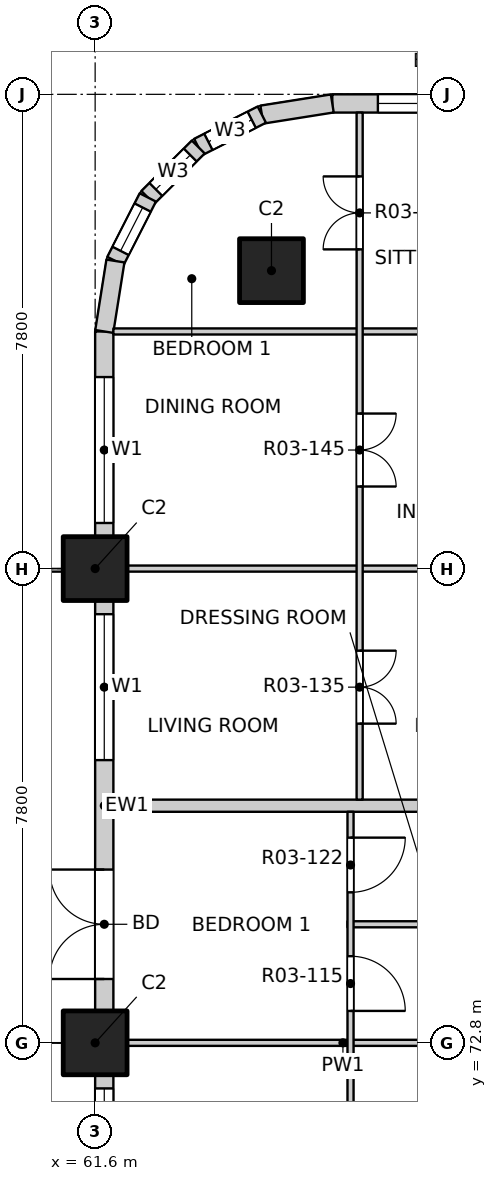
"""IFC4 building model, lengths in metres.
Left out: names, types, materials, properties, quantities, classifications, styles, units other than length and angle.
Written with IfcOpenShell. Run it as: python <this file> out.ifc"""

import sys

from ifc_helpers import new_model, si_unit, direction, frame, frame_2d, origin, origin_2d, place, context, subcontext, project, spatial, rectangle, extrude, element, fill, save


model = new_model("IFC4")
c1 = context("Model", 3, precision=1e-05, world=origin(), true_north=direction((0.0, 1.0)))
c2 = subcontext(c1, "Body", "Model", "MODEL_VIEW")
j1 = project(units=[si_unit("LENGTHUNIT", "METRE"), si_unit("PLANEANGLEUNIT", "RADIAN")], contexts=[c1])
p1 = place(None, origin())
s1 = spatial("IfcSite", under=j1, at=p1, CompositionType="ELEMENT")
p2 = place(p1, origin())
s2 = spatial("IfcBuilding", under=s1, at=p2, CompositionType="ELEMENT")
p3 = place(p2, frame((0.0, 0.0, 43.3)))
s3 = spatial("IfcBuildingStorey", under=s2, at=p3, CompositionType="ELEMENT", Elevation=43.3)
for number, where, z_axis, x_axis in (
    (1, (64.5, 85.5, -0.25), (0.0, 0.0, 1.0), (1.0, 0.0, 0.0)),
    (2, (61.6, 72.8, -0.25), (0.0, 0.0, 1.0), (1.0, 0.0, 0.0)),
    (3, (61.6, 80.6, -0.25), (0.0, 0.0, 1.0), (1.0, 0.0, 0.0)),
):
    element("IfcColumn", number, at=place(p3, frame(where, z_axis=z_axis, x_axis=x_axis)), inside=s3, PredefinedType="COLUMN", context=c2, shape_type="SweptSolid", body=[
        extrude(rectangle(XDim=1.05, YDim=1.05, at=origin_2d()), origin(), (0.0, 0.0, 1.0), 3.35),
    ])
p4 = place(p3, frame((65.5, 88.25, 0.0), z_axis=(0.0, 0.0, 1.0), x_axis=(1.0, 0.0, 0.0)))
e4 = element("IfcWall", 4, at=p4, inside=s3, PredefinedType="SOLIDWALL", context=c2, shape_type="SweptSolid", body=[
    extrude(rectangle(XDim=3.375, YDim=0.3, at=frame_2d((1.688, 0.0))), origin(), (0.0, 0.0, 1.0), 3.1),
])
p5 = place(p4, frame((0.75, 0.0, 0.9)))
e5 = element("IfcOpeningElement", 5, at=p5, cuts=e4, PredefinedType="OPENING", context=c2, shape_type="SweptSolid", body=[
    extrude(rectangle(XDim=2.4, YDim=1.8, at=frame_2d((1.2, 0.9))), frame((0.0, 0.16, 0.0), z_axis=(0.0, -1.0, 0.0), x_axis=(1.0, 0.0, 0.0)), (0.0, 0.0, 1.0), 0.32),
])
p6 = place(p3, frame((61.75, 65.525, 0.0), z_axis=(0.0, 0.0, 1.0), x_axis=(0.0, 1.0, 0.0)))
e6 = element("IfcWall", 6, at=p6, inside=s3, PredefinedType="SOLIDWALL", context=c2, shape_type="SweptSolid", body=[
    extrude(rectangle(XDim=6.75, YDim=0.3, at=frame_2d((3.375, 0.0))), origin(), (0.0, 0.0, 1.0), 3.1),
])
p7 = place(p6, frame((0.525, 0.0, 0.0)))
e7 = element("IfcOpeningElement", 7, at=p7, cuts=e6, PredefinedType="OPENING", context=c2, shape_type="SweptSolid", body=[
    extrude(rectangle(XDim=1.8, YDim=2.4, at=frame_2d((0.9, 1.2))), frame((0.0, 0.16, 0.0), z_axis=(0.0, -1.0, 0.0), x_axis=(1.0, 0.0, 0.0)), (0.0, 0.0, 1.0), 0.32),
])
p8 = place(p6, frame((4.125, 0.0, 0.9)))
e8 = element("IfcOpeningElement", 8, at=p8, cuts=e6, PredefinedType="OPENING", context=c2, shape_type="SweptSolid", body=[
    extrude(rectangle(XDim=2.4, YDim=1.8, at=frame_2d((1.2, 0.9))), frame((0.0, 0.16, 0.0), z_axis=(0.0, -1.0, 0.0), x_axis=(1.0, 0.0, 0.0)), (0.0, 0.0, 1.0), 0.32),
])
p9 = place(p3, frame((61.75, 73.325, 0.0), z_axis=(0.0, 0.0, 1.0), x_axis=(0.0, 1.0, 0.0)))
e9 = element("IfcWall", 9, at=p9, inside=s3, PredefinedType="SOLIDWALL", context=c2, shape_type="SweptSolid", body=[
    extrude(rectangle(XDim=6.75, YDim=0.3, at=frame_2d((3.375, 0.0))), origin(), (0.0, 0.0, 1.0), 3.1),
])
p10 = place(p9, frame((0.525, 0.0, 0.0)))
e10 = element("IfcOpeningElement", 10, at=p10, cuts=e9, PredefinedType="OPENING", context=c2, shape_type="SweptSolid", body=[
    extrude(rectangle(XDim=1.8, YDim=2.4, at=frame_2d((0.9, 1.2))), frame((0.0, 0.16, 0.0), z_axis=(0.0, -1.0, 0.0), x_axis=(1.0, 0.0, 0.0)), (0.0, 0.0, 1.0), 0.32),
])
p11 = place(p9, frame((4.125, 0.0, 0.9)))
e11 = element("IfcOpeningElement", 11, at=p11, cuts=e9, PredefinedType="OPENING", context=c2, shape_type="SweptSolid", body=[
    extrude(rectangle(XDim=2.4, YDim=1.8, at=frame_2d((1.2, 0.9))), frame((0.0, 0.16, 0.0), z_axis=(0.0, -1.0, 0.0), x_axis=(1.0, 0.0, 0.0)), (0.0, 0.0, 1.0), 0.32),
])
p12 = place(p3, frame((61.75, 81.125, 0.0), z_axis=(0.0, 0.0, 1.0), x_axis=(0.0, 1.0, 0.0)))
e12 = element("IfcWall", 12, at=p12, inside=s3, PredefinedType="SOLIDWALL", context=c2, shape_type="SweptSolid", body=[
    extrude(rectangle(XDim=3.375, YDim=0.3, at=frame_2d((1.688, 0.0))), origin(), (0.0, 0.0, 1.0), 3.1),
])
p13 = place(p12, frame((0.225, 0.0, 0.9)))
e13 = element("IfcOpeningElement", 13, at=p13, cuts=e12, PredefinedType="OPENING", context=c2, shape_type="SweptSolid", body=[
    extrude(rectangle(XDim=2.4, YDim=1.8, at=frame_2d((1.2, 0.9))), frame((0.0, 0.16, 0.0), z_axis=(0.0, -1.0, 0.0), x_axis=(1.0, 0.0, 0.0)), (0.0, 0.0, 1.0), 0.32),
])
p14 = place(p3, frame((65.5, 88.25, 0.0), z_axis=(0.0, 0.0, 1.0), x_axis=(-0.987678452879, -0.156496880861, 0.0)))
e14 = element("IfcWall", 14, at=p14, inside=s3, PredefinedType="SOLIDWALL", context=c2, shape_type="SweptSolid", body=[
    extrude(rectangle(XDim=1.173, YDim=0.3, at=frame_2d((0.586, 0.0))), origin(), (0.0, 0.0, 1.0), 3.1),
])
p15 = place(p3, frame((64.341, 88.066, 0.0), z_axis=(0.0, 0.0, 1.0), x_axis=(-0.890988677504, -0.454025524128, 0.0)))
e15 = element("IfcWall", 15, at=p15, inside=s3, PredefinedType="SOLIDWALL", context=c2, shape_type="SweptSolid", body=[
    extrude(rectangle(XDim=1.173, YDim=0.3, at=frame_2d((0.587, 0.0))), origin(), (0.0, 0.0, 1.0), 3.1),
])
p16 = place(p15, frame((0.187, 0.0, 0.9)))
e16 = element("IfcOpeningElement", 16, at=p16, cuts=e15, PredefinedType="OPENING", context=c2, shape_type="SweptSolid", body=[
    extrude(rectangle(XDim=0.8, YDim=1.2, at=frame_2d((0.4, 0.6))), frame((0.0, 0.16, 0.0), z_axis=(0.0, -1.0, 0.0), x_axis=(1.0, 0.0, 0.0)), (0.0, 0.0, 1.0), 0.32),
])
p17 = place(p3, frame((63.296, 87.534, 0.0), z_axis=(0.0, 0.0, 1.0), x_axis=(-0.707106781187, -0.707106781187, 0.0)))
e17 = element("IfcWall", 17, at=p17, inside=s3, PredefinedType="SOLIDWALL", context=c2, shape_type="SweptSolid", body=[
    extrude(rectangle(XDim=1.173, YDim=0.3, at=frame_2d((0.586, 0.0))), origin(), (0.0, 0.0, 1.0), 3.1),
])
p18 = place(p17, frame((0.187, 0.0, 0.9)))
e18 = element("IfcOpeningElement", 18, at=p18, cuts=e17, PredefinedType="OPENING", context=c2, shape_type="SweptSolid", body=[
    extrude(rectangle(XDim=0.8, YDim=1.2, at=frame_2d((0.4, 0.6))), frame((0.0, 0.16, 0.0), z_axis=(0.0, -1.0, 0.0), x_axis=(1.0, 0.0, 0.0)), (0.0, 0.0, 1.0), 0.32),
])
p19 = place(p3, frame((62.466, 86.704, 0.0), z_axis=(0.0, 0.0, 1.0), x_axis=(-0.454025524128, -0.890988677504, 0.0)))
e19 = element("IfcWall", 19, at=p19, inside=s3, PredefinedType="SOLIDWALL", context=c2, shape_type="SweptSolid", body=[
    extrude(rectangle(XDim=1.173, YDim=0.3, at=frame_2d((0.587, 0.0))), origin(), (0.0, 0.0, 1.0), 3.1),
])
p20 = place(p19, frame((0.187, 0.0, 0.9)))
e20 = element("IfcOpeningElement", 20, at=p20, cuts=e19, PredefinedType="OPENING", context=c2, shape_type="SweptSolid", body=[
    extrude(rectangle(XDim=0.8, YDim=1.2, at=frame_2d((0.4, 0.6))), frame((0.0, 0.16, 0.0), z_axis=(0.0, -1.0, 0.0), x_axis=(1.0, 0.0, 0.0)), (0.0, 0.0, 1.0), 0.32),
])
p21 = place(p3, frame((61.934, 85.659, 0.0), z_axis=(0.0, 0.0, 1.0), x_axis=(-0.156496880861, -0.987678452879, 0.0)))
e21 = element("IfcWall", 21, at=p21, inside=s3, PredefinedType="SOLIDWALL", context=c2, shape_type="SweptSolid", body=[
    extrude(rectangle(XDim=1.173, YDim=0.3, at=frame_2d((0.586, 0.0))), origin(), (0.0, 0.0, 1.0), 3.1),
])
p22 = place(p3, frame((61.9, 72.8, 0.0), z_axis=(0.0, 0.0, 1.0), x_axis=(1.0, 0.0, 0.0)))
e22 = element("IfcWall", 22, at=p22, inside=s3, PredefinedType="PARTITIONING", context=c2, shape_type="SweptSolid", body=[
    extrude(rectangle(XDim=7.55, YDim=0.1, at=frame_2d((3.775, 0.0))), origin(), (0.0, 0.0, 1.0), 3.1),
])
p23 = place(p3, frame((65.75, 74.75, 0.0), z_axis=(0.0, 0.0, 1.0), x_axis=(1.0, 0.0, 0.0)))
e23 = element("IfcWall", 23, at=p23, inside=s3, PredefinedType="PARTITIONING", context=c2, shape_type="SweptSolid", body=[
    extrude(rectangle(XDim=3.7, YDim=0.1, at=frame_2d((1.85, 0.0))), origin(), (0.0, 0.0, 1.0), 3.1),
])
p24 = place(p3, frame((61.9, 76.7, 0.0), z_axis=(0.0, 0.0, 1.0), x_axis=(1.0, 0.0, 0.0)))
e24 = element("IfcWall", 24, at=p24, inside=s3, PredefinedType="PARTITIONING", context=c2, shape_type="SweptSolid", body=[
    extrude(rectangle(XDim=11.5, YDim=0.2, at=frame_2d((5.75, 0.0))), origin(), (0.0, 0.0, 1.0), 3.1),
])
p25 = place(p3, frame((61.9, 80.6, 0.0), z_axis=(0.0, 0.0, 1.0), x_axis=(1.0, 0.0, 0.0)))
e25 = element("IfcWall", 25, at=p25, inside=s3, PredefinedType="PARTITIONING", context=c2, shape_type="SweptSolid", body=[
    extrude(rectangle(XDim=7.55, YDim=0.1, at=frame_2d((3.775, 0.0))), origin(), (0.0, 0.0, 1.0), 3.1),
])
p26 = place(p3, frame((61.9, 84.5, 0.0), z_axis=(0.0, 0.0, 1.0), x_axis=(1.0, 0.0, 0.0)))
e26 = element("IfcWall", 26, at=p26, inside=s3, PredefinedType="PARTITIONING", context=c2, shape_type="SweptSolid", body=[
    extrude(rectangle(XDim=11.5, YDim=0.1, at=frame_2d((5.75, 0.0))), origin(), (0.0, 0.0, 1.0), 3.1),
])
p27 = place(p26, frame((7.965, 0.0, 0.0)))
e27 = element("IfcOpeningElement", 27, at=p27, cuts=e26, PredefinedType="OPENING", context=c2, shape_type="SweptSolid", body=[
    extrude(rectangle(XDim=0.9, YDim=2.1, at=frame_2d((0.45, 1.05))), frame((0.0, 0.06, 0.0), z_axis=(0.0, -1.0, 0.0), x_axis=(1.0, 0.0, 0.0)), (0.0, 0.0, 1.0), 0.12),
])
p28 = place(p3, frame((65.8, 69.0, 0.0), z_axis=(0.0, 0.0, 1.0), x_axis=(0.0, 1.0, 0.0)))
e28 = element("IfcWall", 28, at=p28, inside=s3, PredefinedType="PARTITIONING", context=c2, shape_type="SweptSolid", body=[
    extrude(rectangle(XDim=7.6, YDim=0.1, at=frame_2d((3.8, 0.0))), origin(), (0.0, 0.0, 1.0), 3.1),
])
p29 = place(p28, frame((1.25, 0.0, 0.0)))
e29 = element("IfcOpeningElement", 29, at=p29, cuts=e28, PredefinedType="OPENING", context=c2, shape_type="SweptSolid", body=[
    extrude(rectangle(XDim=1.2, YDim=2.1, at=frame_2d((0.6, 1.05))), frame((0.0, 0.06, 0.0), z_axis=(0.0, -1.0, 0.0), x_axis=(1.0, 0.0, 0.0)), (0.0, 0.0, 1.0), 0.12),
])
p30 = place(p28, frame((4.325, 0.0, 0.0)))
e30 = element("IfcOpeningElement", 30, at=p30, cuts=e28, PredefinedType="OPENING", context=c2, shape_type="SweptSolid", body=[
    extrude(rectangle(XDim=0.9, YDim=2.1, at=frame_2d((0.45, 1.05))), frame((0.0, 0.06, 0.0), z_axis=(0.0, -1.0, 0.0), x_axis=(1.0, 0.0, 0.0)), (0.0, 0.0, 1.0), 0.12),
])
p31 = place(p28, frame((6.275, 0.0, 0.0)))
e31 = element("IfcOpeningElement", 31, at=p31, cuts=e28, PredefinedType="OPENING", context=c2, shape_type="SweptSolid", body=[
    extrude(rectangle(XDim=0.9, YDim=2.1, at=frame_2d((0.45, 1.05))), frame((0.0, 0.06, 0.0), z_axis=(0.0, -1.0, 0.0), x_axis=(1.0, 0.0, 0.0)), (0.0, 0.0, 1.0), 0.12),
])
p32 = place(p3, frame((65.95, 76.8, 0.0), z_axis=(0.0, 0.0, 1.0), x_axis=(0.0, 1.0, 0.0)))
e32 = element("IfcWall", 32, at=p32, inside=s3, PredefinedType="PARTITIONING", context=c2, shape_type="SweptSolid", body=[
    extrude(rectangle(XDim=11.3, YDim=0.1, at=frame_2d((5.65, 0.0))), origin(), (0.0, 0.0, 1.0), 3.1),
])
p33 = place(p32, frame((1.25, 0.0, 0.0)))
e33 = element("IfcOpeningElement", 33, at=p33, cuts=e32, PredefinedType="OPENING", context=c2, shape_type="SweptSolid", body=[
    extrude(rectangle(XDim=1.2, YDim=2.1, at=frame_2d((0.6, 1.05))), frame((0.0, 0.06, 0.0), z_axis=(0.0, -1.0, 0.0), x_axis=(1.0, 0.0, 0.0)), (0.0, 0.0, 1.0), 0.12),
])
p34 = place(p32, frame((5.15, 0.0, 0.0)))
e34 = element("IfcOpeningElement", 34, at=p34, cuts=e32, PredefinedType="OPENING", context=c2, shape_type="SweptSolid", body=[
    extrude(rectangle(XDim=1.2, YDim=2.1, at=frame_2d((0.6, 1.05))), frame((0.0, 0.06, 0.0), z_axis=(0.0, -1.0, 0.0), x_axis=(1.0, 0.0, 0.0)), (0.0, 0.0, 1.0), 0.12),
])
p35 = place(p32, frame((9.05, 0.0, 0.0)))
e35 = element("IfcOpeningElement", 35, at=p35, cuts=e32, PredefinedType="OPENING", context=c2, shape_type="SweptSolid", body=[
    extrude(rectangle(XDim=1.2, YDim=2.1, at=frame_2d((0.6, 1.05))), frame((0.0, 0.06, 0.0), z_axis=(0.0, -1.0, 0.0), x_axis=(1.0, 0.0, 0.0)), (0.0, 0.0, 1.0), 0.12),
])
p36 = place(p5, origin())
e36 = element("IfcWindow", 36, at=p36, inside=s3, PartitioningType="DOUBLE_PANEL_VERTICAL", PredefinedType="WINDOW", context=c2, shape_type="SweptSolid", body=[
    extrude(rectangle(XDim=2.4, YDim=1.8, at=frame_2d((1.2, 0.9))), frame((0.0, 0.03, 0.0), z_axis=(0.0, -1.0, 0.0), x_axis=(1.0, 0.0, 0.0)), (0.0, 0.0, 1.0), 0.06),
])
fill(e5, e36)
p37 = place(p8, origin())
e37 = element("IfcWindow", 37, at=p37, inside=s3, PartitioningType="DOUBLE_PANEL_VERTICAL", PredefinedType="WINDOW", context=c2, shape_type="SweptSolid", body=[
    extrude(rectangle(XDim=2.4, YDim=1.8, at=frame_2d((1.2, 0.9))), frame((0.0, 0.03, 0.0), z_axis=(0.0, -1.0, 0.0), x_axis=(1.0, 0.0, 0.0)), (0.0, 0.0, 1.0), 0.06),
])
fill(e8, e37)
p38 = place(p10, origin())
e38 = element("IfcDoor", 38, at=p38, inside=s3, OperationType="DOUBLE_DOOR_SINGLE_SWING", PredefinedType="DOOR", context=c2, shape_type="SweptSolid", body=[
    extrude(rectangle(XDim=1.8, YDim=2.4, at=frame_2d((0.9, 1.2))), frame((0.0, 0.025, 0.0), z_axis=(0.0, -1.0, 0.0), x_axis=(1.0, 0.0, 0.0)), (0.0, 0.0, 1.0), 0.05),
])
fill(e10, e38)
p39 = place(p11, origin())
e39 = element("IfcWindow", 39, at=p39, inside=s3, PartitioningType="DOUBLE_PANEL_VERTICAL", PredefinedType="WINDOW", context=c2, shape_type="SweptSolid", body=[
    extrude(rectangle(XDim=2.4, YDim=1.8, at=frame_2d((1.2, 0.9))), frame((0.0, 0.03, 0.0), z_axis=(0.0, -1.0, 0.0), x_axis=(1.0, 0.0, 0.0)), (0.0, 0.0, 1.0), 0.06),
])
fill(e11, e39)
p40 = place(p13, origin())
e40 = element("IfcWindow", 40, at=p40, inside=s3, PartitioningType="DOUBLE_PANEL_VERTICAL", PredefinedType="WINDOW", context=c2, shape_type="SweptSolid", body=[
    extrude(rectangle(XDim=2.4, YDim=1.8, at=frame_2d((1.2, 0.9))), frame((0.0, 0.03, 0.0), z_axis=(0.0, -1.0, 0.0), x_axis=(1.0, 0.0, 0.0)), (0.0, 0.0, 1.0), 0.06),
])
fill(e13, e40)
p41 = place(p16, origin())
e41 = element("IfcWindow", 41, at=p41, inside=s3, PartitioningType="SINGLE_PANEL", PredefinedType="WINDOW", context=c2, shape_type="SweptSolid", body=[
    extrude(rectangle(XDim=0.8, YDim=1.2, at=frame_2d((0.4, 0.6))), frame((0.0, 0.03, 0.0), z_axis=(0.0, -1.0, 0.0), x_axis=(1.0, 0.0, 0.0)), (0.0, 0.0, 1.0), 0.06),
])
fill(e16, e41)
p42 = place(p18, origin())
e42 = element("IfcWindow", 42, at=p42, inside=s3, PartitioningType="SINGLE_PANEL", PredefinedType="WINDOW", context=c2, shape_type="SweptSolid", body=[
    extrude(rectangle(XDim=0.8, YDim=1.2, at=frame_2d((0.4, 0.6))), frame((0.0, 0.03, 0.0), z_axis=(0.0, -1.0, 0.0), x_axis=(1.0, 0.0, 0.0)), (0.0, 0.0, 1.0), 0.06),
])
fill(e18, e42)
p43 = place(p20, origin())
e43 = element("IfcWindow", 43, at=p43, inside=s3, PartitioningType="SINGLE_PANEL", PredefinedType="WINDOW", context=c2, shape_type="SweptSolid", body=[
    extrude(rectangle(XDim=0.8, YDim=1.2, at=frame_2d((0.4, 0.6))), frame((0.0, 0.03, 0.0), z_axis=(0.0, -1.0, 0.0), x_axis=(1.0, 0.0, 0.0)), (0.0, 0.0, 1.0), 0.06),
])
fill(e20, e43)
p44 = place(p30, origin())
e44 = element("IfcDoor", 44, at=p44, inside=s3, OperationType="SINGLE_SWING_RIGHT", PredefinedType="DOOR", context=c2, shape_type="SweptSolid", body=[
    extrude(rectangle(XDim=0.9, YDim=2.1, at=frame_2d((0.45, 1.05))), frame((0.0, 0.025, 0.0), z_axis=(0.0, -1.0, 0.0), x_axis=(1.0, 0.0, 0.0)), (0.0, 0.0, 1.0), 0.05),
])
fill(e30, e44)
p45 = place(p31, origin())
e45 = element("IfcDoor", 45, at=p45, inside=s3, OperationType="SINGLE_SWING_LEFT", PredefinedType="DOOR", context=c2, shape_type="SweptSolid", body=[
    extrude(rectangle(XDim=0.9, YDim=2.1, at=frame_2d((0.45, 1.05))), frame((0.0, 0.025, 0.0), z_axis=(0.0, -1.0, 0.0), x_axis=(1.0, 0.0, 0.0)), (0.0, 0.0, 1.0), 0.05),
])
fill(e31, e45)
p46 = place(p33, origin())
e46 = element("IfcDoor", 46, at=p46, inside=s3, OperationType="DOUBLE_DOOR_SINGLE_SWING", PredefinedType="DOOR", context=c2, shape_type="SweptSolid", body=[
    extrude(rectangle(XDim=1.2, YDim=2.1, at=frame_2d((0.6, 1.05))), frame((0.0, 0.025, 0.0), z_axis=(0.0, -1.0, 0.0), x_axis=(1.0, 0.0, 0.0)), (0.0, 0.0, 1.0), 0.05),
])
fill(e33, e46)
p47 = place(p34, origin())
e47 = element("IfcDoor", 47, at=p47, inside=s3, OperationType="DOUBLE_DOOR_SINGLE_SWING", PredefinedType="DOOR", context=c2, shape_type="SweptSolid", body=[
    extrude(rectangle(XDim=1.2, YDim=2.1, at=frame_2d((0.6, 1.05))), frame((0.0, 0.025, 0.0), z_axis=(0.0, -1.0, 0.0), x_axis=(1.0, 0.0, 0.0)), (0.0, 0.0, 1.0), 0.05),
])
fill(e34, e47)
p48 = place(p35, origin())
e48 = element("IfcDoor", 48, at=p48, inside=s3, OperationType="DOUBLE_DOOR_SINGLE_SWING", PredefinedType="DOOR", context=c2, shape_type="SweptSolid", body=[
    extrude(rectangle(XDim=1.2, YDim=2.1, at=frame_2d((0.6, 1.05))), frame((0.0, 0.025, 0.0), z_axis=(0.0, -1.0, 0.0), x_axis=(1.0, 0.0, 0.0)), (0.0, 0.0, 1.0), 0.05),
])
fill(e35, e48)
save(model, sys.argv[1])
